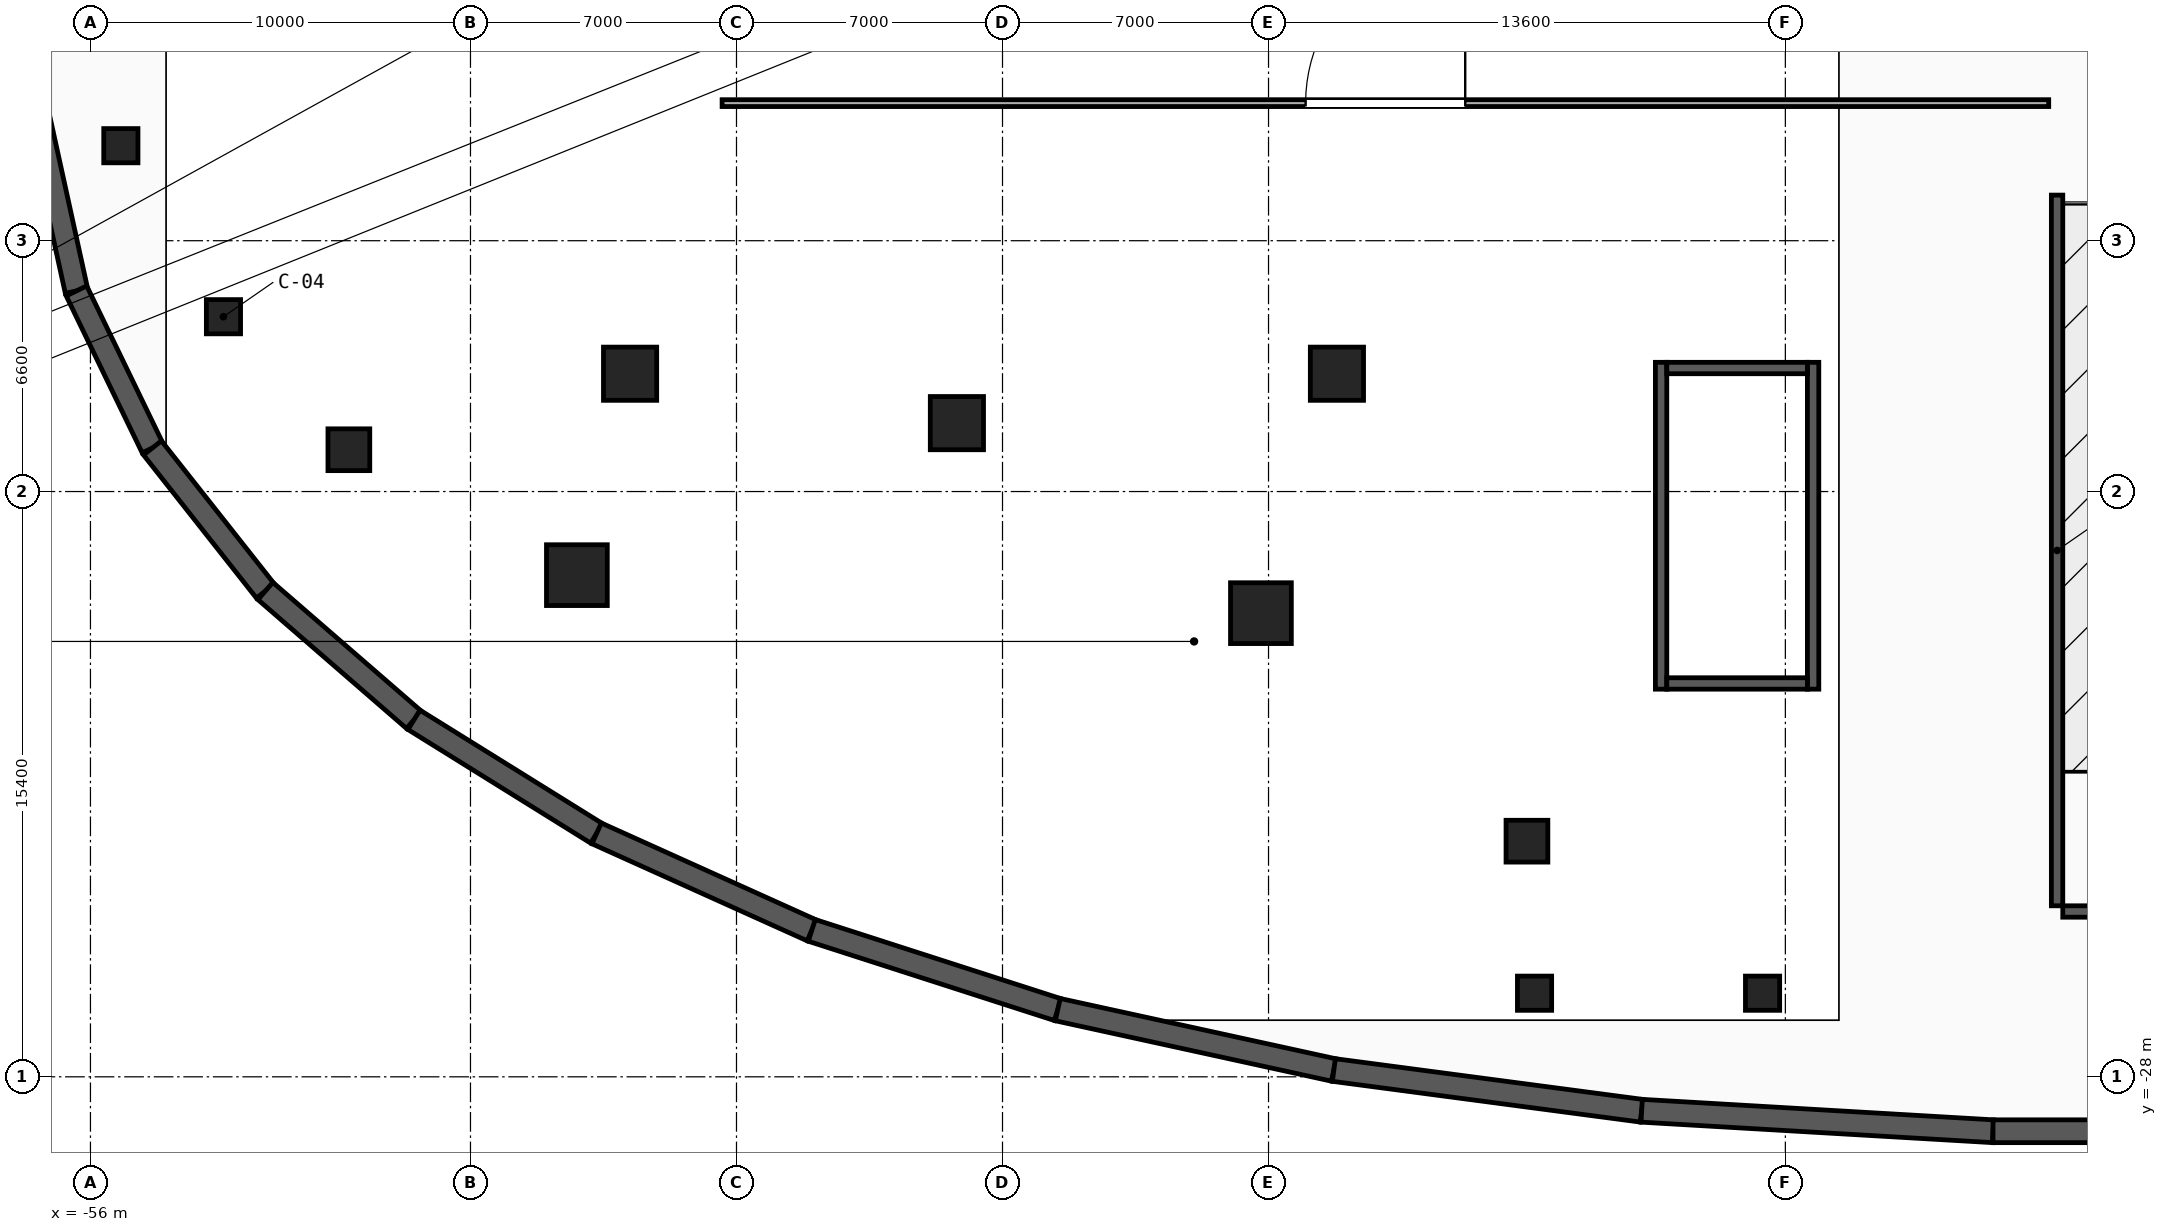
"""IFC4 building model, lengths in metres.
Left out: names, types, materials, properties, quantities, classifications, styles, units other than length and angle.
Written with IfcOpenShell. Run it as: python <this file> out.ifc"""

import sys

from ifc_helpers import new_model, si_unit, direction, frame, frame_2d, origin, origin_2d, place, context, subcontext, project, spatial, rectangle, circle, extrude, element, fill, save


model = new_model("IFC4")
c1 = context("Model", 3, precision=1e-05, world=origin(), true_north=direction((0.0, 1.0)))
c2 = subcontext(c1, "Body", "Model", "MODEL_VIEW")
j1 = project(units=[si_unit("LENGTHUNIT", "METRE"), si_unit("PLANEANGLEUNIT", "RADIAN")], contexts=[c1])
p1 = place(None, origin())
s1 = spatial("IfcSite", under=j1, at=p1, CompositionType="ELEMENT")
p2 = place(p1, origin())
s2 = spatial("IfcBuilding", under=s1, at=p2, CompositionType="ELEMENT")
p3 = place(p2, frame((0.0, 0.0, -9.0)))
s3 = spatial("IfcBuildingStorey", under=s2, at=p3, CompositionType="ELEMENT", Elevation=-9.0)
for number, where, z_axis, x_axis in (
    (1, (-41.8, -9.5, 0.0), (0.0, 0.0, 1.0), (1.0, 0.0, 0.0)),
    (2, (-33.2, -10.8, 0.0), (0.0, 0.0, 1.0), (1.0, 0.0, 0.0)),
    (3, (-23.2, -9.5, 0.0), (0.0, 0.0, 1.0), (1.0, 0.0, 0.0)),
):
    element("IfcColumn", number, at=place(p3, frame(where, z_axis=z_axis, x_axis=x_axis)), inside=s3, PredefinedType="COLUMN", context=c2, shape_type="SweptSolid", body=[
        extrude(rectangle(XDim=1.4, YDim=1.4, at=origin_2d()), origin(), (0.0, 0.0, 1.0), 4.5),
    ])
for number, where, z_axis, x_axis in (
    (4, (-43.2, -14.8, 0.0), (0.0, 0.0, 1.0), (1.0, 0.0, 0.0)),
    (5, (-25.2, -15.8, 0.0), (0.0, 0.0, 1.0), (1.0, 0.0, 0.0)),
):
    element("IfcColumn", number, at=place(p3, frame(where, z_axis=z_axis, x_axis=x_axis)), inside=s3, PredefinedType="COLUMN", context=c2, shape_type="SweptSolid", body=[
        extrude(rectangle(XDim=1.6, YDim=1.6, at=origin_2d()), origin(), (0.0, 0.0, 1.0), 4.5),
    ])
for number, where, z_axis, x_axis in (
    (6, (-49.2, -11.5, 0.0), (0.0, 0.0, 1.0), (1.0, 0.0, 0.0)),
    (7, (-18.2, -21.8, 0.0), (0.0, 0.0, 1.0), (1.0, 0.0, 0.0)),
):
    element("IfcColumn", number, at=place(p3, frame(where, z_axis=z_axis, x_axis=x_axis)), inside=s3, PredefinedType="PILASTER", context=c2, shape_type="SweptSolid", body=[
        extrude(circle(Radius=0.55, at=origin_2d()), origin(), (0.0, 0.0, 1.0), 4.5),
    ])
for number, where, z_axis, x_axis in (
    (8, (-52.5, -8.0, 0.0), (0.0, 0.0, 1.0), (1.0, 0.0, 0.0)),
    (9, (-55.2, -3.5, 0.0), (0.0, 0.0, 1.0), (1.0, 0.0, 0.0)),
    (10, (-18.0, -25.8, 0.0), (0.0, 0.0, 1.0), (1.0, 0.0, 0.0)),
    (11, (-12.0, -25.8, 0.0), (0.0, 0.0, 1.0), (1.0, 0.0, 0.0)),
):
    element("IfcColumn", number, at=place(p3, frame(where, z_axis=z_axis, x_axis=x_axis)), inside=s3, PredefinedType="COLUMN", context=c2, shape_type="SweptSolid", body=[
        extrude(rectangle(XDim=0.9, YDim=0.9, at=origin_2d()), origin(), (0.0, 0.0, 1.0), 4.5),
    ])
p4 = place(p3, frame((-57.374, -2.74, 0.0), z_axis=(0.0, 0.0, 1.0), x_axis=(0.214510247434, -0.976721738135, 0.0)))
e12 = element("IfcWall", 12, at=p4, inside=s3, PredefinedType="USERDEFINED", context=c2, shape_type="SweptSolid", body=[
    extrude(rectangle(XDim=4.69, YDim=0.6, at=frame_2d((2.345, 0.0))), origin(), (0.0, 0.0, 1.0), 4.15),
])
p5 = place(p3, frame((-56.368, -7.321, 0.0), z_axis=(0.0, 0.0, 1.0), x_axis=(0.435772260249, -0.900056963307, 0.0)))
e13 = element("IfcWall", 13, at=p5, inside=s3, PredefinedType="USERDEFINED", context=c2, shape_type="SweptSolid", body=[
    extrude(rectangle(XDim=4.59, YDim=0.6, at=frame_2d((2.295, 0.0))), origin(), (0.0, 0.0, 1.0), 4.15),
])
p6 = place(p3, frame((-54.368, -11.452, 0.0), z_axis=(0.0, 0.0, 1.0), x_axis=(0.619447864054, -0.785037797637, 0.0)))
e14 = element("IfcWall", 14, at=p6, inside=s3, PredefinedType="USERDEFINED", context=c2, shape_type="SweptSolid", body=[
    extrude(rectangle(XDim=4.796, YDim=0.6, at=frame_2d((2.398, 0.0))), origin(), (0.0, 0.0, 1.0), 4.15),
])
p7 = place(p3, frame((-51.397, -15.217, 0.0), z_axis=(0.0, 0.0, 1.0), x_axis=(0.755564536906, -0.655074217605, 0.0)))
e15 = element("IfcWall", 15, at=p7, inside=s3, PredefinedType="USERDEFINED", context=c2, shape_type="SweptSolid", body=[
    extrude(rectangle(XDim=5.175, YDim=0.6, at=frame_2d((2.587, 0.0))), origin(), (0.0, 0.0, 1.0), 4.15),
])
p8 = place(p3, frame((-47.487, -18.607, 0.0), z_axis=(0.0, 0.0, 1.0), x_axis=(0.849299437699, -0.527911417877, 0.0)))
e16 = element("IfcWall", 16, at=p8, inside=s3, PredefinedType="USERDEFINED", context=c2, shape_type="SweptSolid", body=[
    extrude(rectangle(XDim=5.66, YDim=0.6, at=frame_2d((2.83, 0.0))), origin(), (0.0, 0.0, 1.0), 4.15),
])
p9 = place(p3, frame((-42.68, -21.595, 0.0), z_axis=(0.0, 0.0, 1.0), x_axis=(0.911643952457, -0.410980904603, 0.0)))
e17 = element("IfcWall", 17, at=p9, inside=s3, PredefinedType="USERDEFINED", context=c2, shape_type="SweptSolid", body=[
    extrude(rectangle(XDim=6.209, YDim=0.6, at=frame_2d((3.105, 0.0))), origin(), (0.0, 0.0, 1.0), 4.15),
])
p10 = place(p3, frame((-37.019, -24.147, 0.0), z_axis=(0.0, 0.0, 1.0), x_axis=(0.951843868052, -0.306583187492, 0.0)))
e18 = element("IfcWall", 18, at=p10, inside=s3, PredefinedType="USERDEFINED", context=c2, shape_type="SweptSolid", body=[
    extrude(rectangle(XDim=6.801, YDim=0.6, at=frame_2d((3.4, 0.0))), origin(), (0.0, 0.0, 1.0), 4.15),
])
p11 = place(p3, frame((-30.546, -26.232, 0.0), z_axis=(0.0, 0.0, 1.0), x_axis=(0.976902373216, -0.213686109059, 0.0)))
e19 = element("IfcWall", 19, at=p11, inside=s3, PredefinedType="USERDEFINED", context=c2, shape_type="SweptSolid", body=[
    extrude(rectangle(XDim=7.437, YDim=0.6, at=frame_2d((3.718, 0.0))), origin(), (0.0, 0.0, 1.0), 4.15),
])
p12 = place(p3, frame((-23.281, -27.821, 0.0), z_axis=(0.0, 0.0, 1.0), x_axis=(0.991355566156, -0.131202673187, 0.0)))
e20 = element("IfcWall", 20, at=p12, inside=s3, PredefinedType="USERDEFINED", context=c2, shape_type="SweptSolid", body=[
    extrude(rectangle(XDim=8.171, YDim=0.6, at=frame_2d((4.085, 0.0))), origin(), (0.0, 0.0, 1.0), 4.15),
])
p13 = place(p3, frame((-15.181, -28.893, 0.0), z_axis=(0.0, 0.0, 1.0), x_axis=(0.998305864477, -0.058184198455, 0.0)))
e21 = element("IfcWall", 21, at=p13, inside=s3, PredefinedType="USERDEFINED", context=c2, shape_type="SweptSolid", body=[
    extrude(rectangle(XDim=9.26, YDim=0.6, at=frame_2d((4.63, 0.0))), origin(), (0.0, 0.0, 1.0), 4.15),
])
p14 = place(p3, frame((-5.936, -29.432, 0.0), z_axis=(0.0, 0.0, 1.0), x_axis=(1.0, 0.0, 0.0)))
e22 = element("IfcWall", 22, at=p14, inside=s3, PredefinedType="USERDEFINED", context=c2, shape_type="SweptSolid", body=[
    extrude(rectangle(XDim=11.872, YDim=0.6, at=frame_2d((5.936, 0.0))), origin(), (0.0, 0.0, 1.0), 4.15),
])
p15 = place(p3, frame((-4.25, -23.5, 0.0), z_axis=(0.0, 0.0, 1.0), x_axis=(0.0, 1.0, 0.0)))
e23 = element("IfcWall", 23, at=p15, inside=s3, PredefinedType="SHEAR", context=c2, shape_type="SweptSolid", body=[
    extrude(rectangle(XDim=18.7, YDim=0.3, at=frame_2d((9.35, 0.0))), origin(), (0.0, 0.0, 1.0), 4.5),
])
p16 = place(p3, frame((-4.1, -23.65, 0.0), z_axis=(0.0, 0.0, 1.0), x_axis=(1.0, 0.0, 0.0)))
e24 = element("IfcWall", 24, at=p16, inside=s3, PredefinedType="SHEAR", context=c2, shape_type="SweptSolid", body=[
    extrude(rectangle(XDim=6.2, YDim=0.3, at=frame_2d((3.1, 0.0))), origin(), (0.0, 0.0, 1.0), 4.5),
])
for number, where, z_axis, x_axis in (
    (25, (-14.67, -17.8, 0.0), (0.0, 0.0, 1.0), (0.0, 1.0, 0.0)),
    (26, (-10.67, -17.8, 0.0), (0.0, 0.0, 1.0), (0.0, 1.0, 0.0)),
):
    element("IfcWall", number, at=place(p3, frame(where, z_axis=z_axis, x_axis=x_axis)), inside=s3, PredefinedType="SHEAR", context=c2, shape_type="SweptSolid", body=[
        extrude(rectangle(XDim=8.6, YDim=0.3, at=frame_2d((4.3, 0.0))), origin(), (0.0, 0.0, 1.0), 4.15),
    ])
for number, where, z_axis, x_axis in (
    (27, (-14.52, -17.65, 0.0), (0.0, 0.0, 1.0), (1.0, 0.0, 0.0)),
    (28, (-14.52, -9.35, 0.0), (0.0, 0.0, 1.0), (1.0, 0.0, 0.0)),
):
    element("IfcWall", number, at=place(p3, frame(where, z_axis=z_axis, x_axis=x_axis)), inside=s3, PredefinedType="SHEAR", context=c2, shape_type="SweptSolid", body=[
        extrude(rectangle(XDim=3.7, YDim=0.3, at=frame_2d((1.85, 0.0))), origin(), (0.0, 0.0, 1.0), 4.15),
    ])
p17 = place(p3, frame((-39.378, -2.38, 0.0), z_axis=(0.0, 0.0, 1.0), x_axis=(1.0, 0.0, 0.0)))
e29 = element("IfcWall", 29, at=p17, inside=s3, PredefinedType="PARTITIONING", context=c2, shape_type="SweptSolid", body=[
    extrude(rectangle(XDim=34.908, YDim=0.18, at=frame_2d((17.454, 0.0))), origin(), (0.0, 0.0, 1.0), 4.15),
])
p18 = place(p17, frame((15.354, 0.0, 0.0)))
e30 = element("IfcOpeningElement", 30, at=p18, cuts=e29, PredefinedType="OPENING", context=c2, shape_type="SweptSolid", body=[
    extrude(rectangle(XDim=4.2, YDim=2.8, at=frame_2d((2.1, 1.4))), frame((0.0, 0.1, 0.0), z_axis=(0.0, -1.0, 0.0), x_axis=(1.0, 0.0, 0.0)), (0.0, 0.0, 1.0), 0.2),
])
p19 = place(p18, origin())
e31 = element("IfcDoor", 31, at=p19, inside=s3, OperationType="SINGLE_SWING_RIGHT", PredefinedType="GATE", context=c2, shape_type="SweptSolid", body=[
    extrude(rectangle(XDim=4.2, YDim=2.8, at=frame_2d((2.1, 1.4))), frame((0.0, 0.025, 0.0), z_axis=(0.0, -1.0, 0.0), x_axis=(1.0, 0.0, 0.0)), (0.0, 0.0, 1.0), 0.05),
])
fill(e30, e31)
save(model, sys.argv[1])
